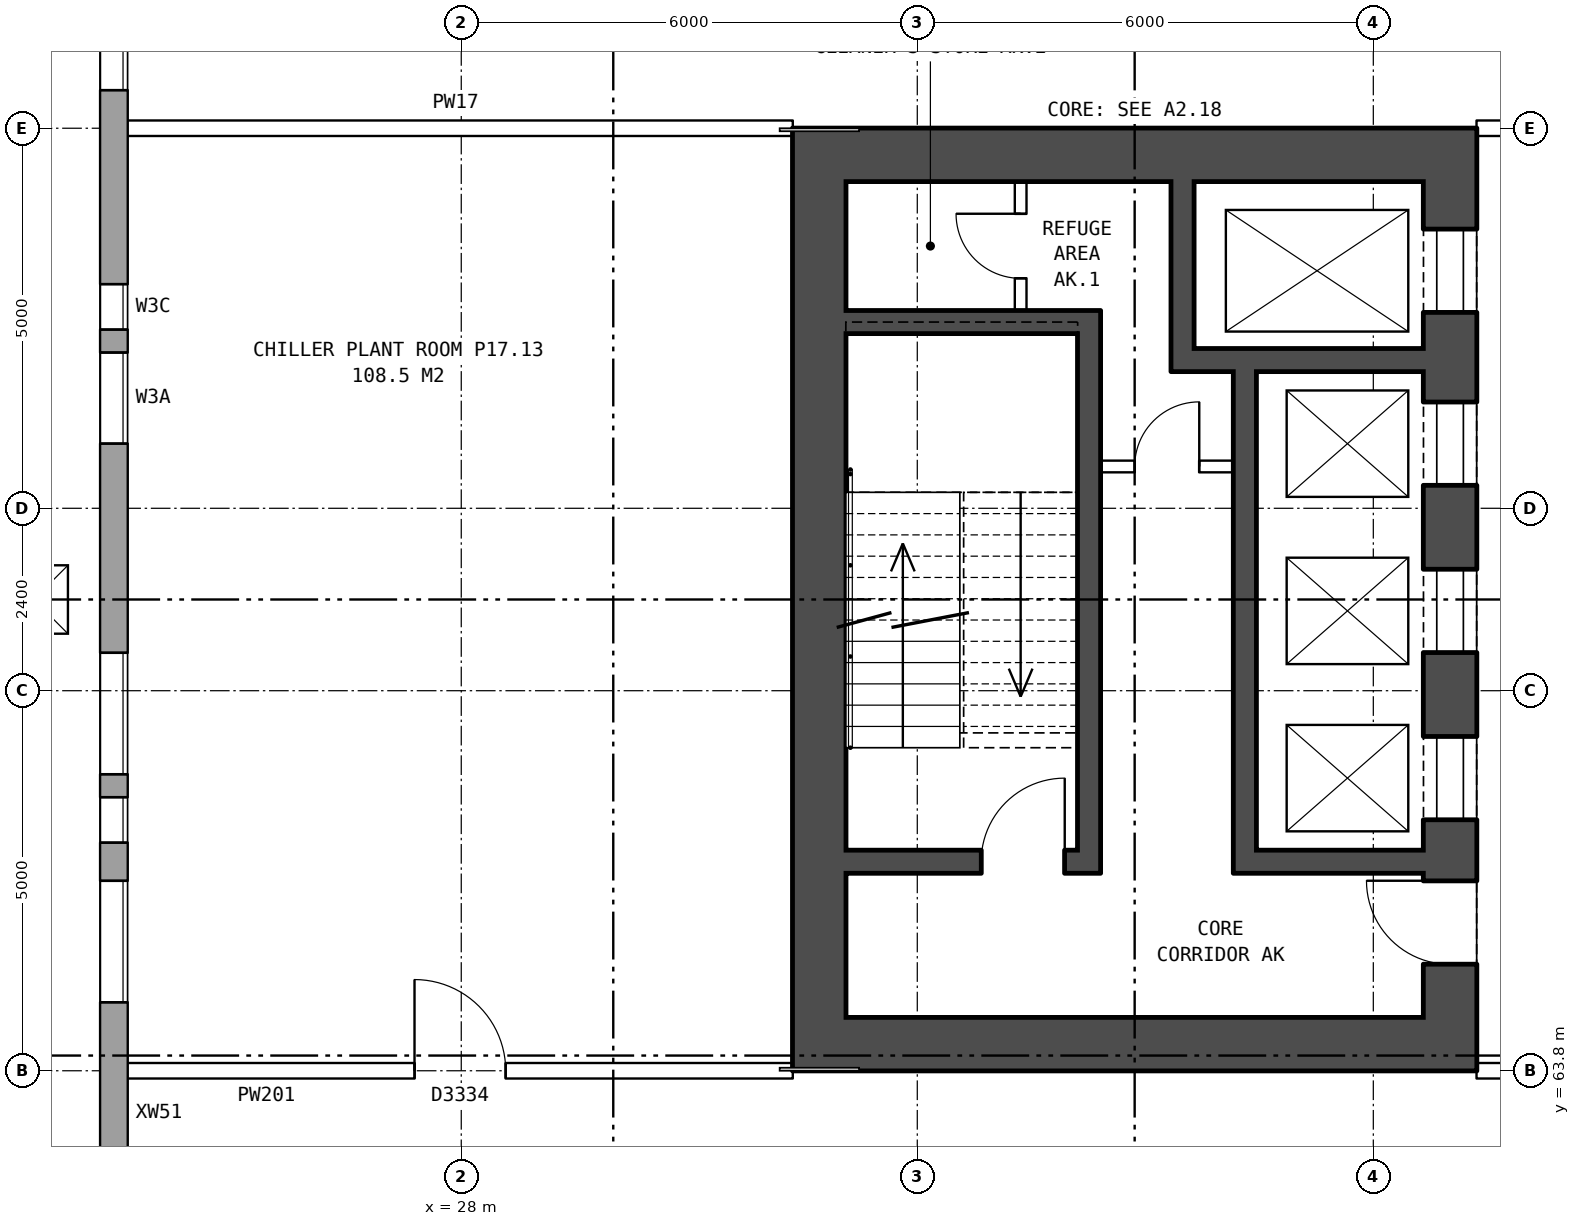
"""IFC4 building model, lengths in metres.
Left out: names, types, materials, properties, quantities, classifications, styles, units other than length and angle.
Written with IfcOpenShell. Run it as: python <this file> out.ifc"""

import sys

from ifc_helpers import new_model, si_unit, direction, frame, frame_2d, origin, origin_2d, place, context, subcontext, project, spatial, rectangle, extrude, element, fill, save


model = new_model("IFC4")
c1 = context("Model", 3, precision=1e-05, world=origin(), true_north=direction((0.0, 1.0)))
c2 = subcontext(c1, "Body", "Model", "MODEL_VIEW")
j1 = project(units=[si_unit("LENGTHUNIT", "METRE"), si_unit("PLANEANGLEUNIT", "RADIAN")], contexts=[c1])
p1 = place(None, origin())
s1 = spatial("IfcSite", under=j1, at=p1, CompositionType="ELEMENT")
p2 = place(p1, origin())
s2 = spatial("IfcBuilding", under=s1, at=p2, CompositionType="ELEMENT")
p3 = place(p2, frame((0.0, 0.0, 62.9)))
s3 = spatial("IfcBuildingStorey", under=s2, at=p3, CompositionType="ELEMENT", Elevation=62.9)
p4 = place(p3, frame((23.43, 82.925, 0.0), z_axis=(0.0, 0.0, 1.0), x_axis=(0.0, -1.0, 0.0)))
e1 = element("IfcWall", 1, at=p4, inside=s3, PredefinedType="STANDARD", context=c2, shape_type="SweptSolid", body=[
    extrude(rectangle(XDim=25.851, YDim=0.36, at=frame_2d((12.925, 0.0))), origin(), (0.0, 0.0, 1.0), 4.2),
])
p5 = place(p4, frame((1.625, 0.0, 1.5)))
e2 = element("IfcOpeningElement", 2, at=p5, cuts=e1, PredefinedType="OPENING", context=c2, shape_type="SweptSolid", body=[
    extrude(rectangle(XDim=1.6, YDim=1.2, at=frame_2d((0.8, 0.6))), frame((0.0, 0.19, 0.0), z_axis=(0.0, -1.0, 0.0), x_axis=(1.0, 0.0, 0.0)), (0.0, 0.0, 1.0), 0.38),
])
p6 = place(p4, frame((4.625, 0.0, 1.5)))
e3 = element("IfcOpeningElement", 3, at=p6, cuts=e1, PredefinedType="OPENING", context=c2, shape_type="SweptSolid", body=[
    extrude(rectangle(XDim=1.6, YDim=1.2, at=frame_2d((0.8, 0.6))), frame((0.0, 0.19, 0.0), z_axis=(0.0, -1.0, 0.0), x_axis=(1.0, 0.0, 0.0)), (0.0, 0.0, 1.0), 0.38),
])
p7 = place(p4, frame((8.775, 0.0, 1.5)))
e4 = element("IfcOpeningElement", 4, at=p7, cuts=e1, PredefinedType="OPENING", context=c2, shape_type="SweptSolid", body=[
    extrude(rectangle(XDim=0.6, YDim=1.2, at=frame_2d((0.3, 0.6))), frame((0.0, 0.19, 0.0), z_axis=(0.0, -1.0, 0.0), x_axis=(1.0, 0.0, 0.0)), (0.0, 0.0, 1.0), 0.38),
])
p8 = place(p4, frame((9.675, 0.0, 1.5)))
e5 = element("IfcOpeningElement", 5, at=p8, cuts=e1, PredefinedType="OPENING", context=c2, shape_type="SweptSolid", body=[
    extrude(rectangle(XDim=1.2, YDim=1.2, at=frame_2d((0.6, 0.6))), frame((0.0, 0.19, 0.0), z_axis=(0.0, -1.0, 0.0), x_axis=(1.0, 0.0, 0.0)), (0.0, 0.0, 1.0), 0.38),
])
p9 = place(p4, frame((13.625, 0.0, 1.5)))
e6 = element("IfcOpeningElement", 6, at=p9, cuts=e1, PredefinedType="OPENING", context=c2, shape_type="SweptSolid", body=[
    extrude(rectangle(XDim=1.6, YDim=1.2, at=frame_2d((0.8, 0.6))), frame((0.0, 0.19, 0.0), z_axis=(0.0, -1.0, 0.0), x_axis=(1.0, 0.0, 0.0)), (0.0, 0.0, 1.0), 0.38),
])
p10 = place(p4, frame((16.625, 0.0, 1.5)))
e7 = element("IfcOpeningElement", 7, at=p10, cuts=e1, PredefinedType="OPENING", context=c2, shape_type="SweptSolid", body=[
    extrude(rectangle(XDim=1.6, YDim=1.2, at=frame_2d((0.8, 0.6))), frame((0.0, 0.19, 0.0), z_axis=(0.0, -1.0, 0.0), x_axis=(1.0, 0.0, 0.0)), (0.0, 0.0, 1.0), 0.38),
])
p11 = place(p4, frame((21.125, 0.0, 1.5)))
e8 = element("IfcOpeningElement", 8, at=p11, cuts=e1, PredefinedType="OPENING", context=c2, shape_type="SweptSolid", body=[
    extrude(rectangle(XDim=0.6, YDim=1.2, at=frame_2d((0.3, 0.6))), frame((0.0, 0.19, 0.0), z_axis=(0.0, -1.0, 0.0), x_axis=(1.0, 0.0, 0.0)), (0.0, 0.0, 1.0), 0.38),
])
p12 = place(p4, frame((22.325, 0.0, 1.5)))
e9 = element("IfcOpeningElement", 9, at=p12, cuts=e1, PredefinedType="OPENING", context=c2, shape_type="SweptSolid", body=[
    extrude(rectangle(XDim=0.9, YDim=1.2, at=frame_2d((0.45, 0.6))), frame((0.0, 0.19, 0.0), z_axis=(0.0, -1.0, 0.0), x_axis=(1.0, 0.0, 0.0)), (0.0, 0.0, 1.0), 0.38),
])
p13 = place(p4, frame((15.525, 0.0, 1.5)))
e10 = element("IfcOpeningElement", 10, at=p13, cuts=e1, PredefinedType="OPENING", context=c2, shape_type="SweptSolid", body=[
    extrude(rectangle(XDim=0.6, YDim=1.2, at=frame_2d((0.3, 0.6))), frame((0.0, 0.19, 0.0), z_axis=(0.0, -1.0, 0.0), x_axis=(1.0, 0.0, 0.0)), (0.0, 0.0, 1.0), 0.38),
])
p14 = place(p3, frame((41.01, 75.5, 0.0), z_axis=(0.0, 0.0, 1.0), x_axis=(0.0, -1.0, 0.0)))
e11 = element("IfcWall", 11, at=p14, inside=s3, PredefinedType="SHEAR", context=c2, shape_type="SweptSolid", body=[
    extrude(rectangle(XDim=11.0, YDim=0.7, at=frame_2d((5.5, 0.0))), origin(), (0.0, 0.0, 1.0), 4.2),
])
p15 = place(p14, frame((0.625, 0.0, 0.0)))
e12 = element("IfcOpeningElement", 12, at=p15, cuts=e11, PredefinedType="OPENING", context=c2, shape_type="SweptSolid", body=[
    extrude(rectangle(XDim=1.1, YDim=2.1, at=frame_2d((0.55, 1.05))), frame((0.0, 0.36, 0.0), z_axis=(0.0, -1.0, 0.0), x_axis=(1.0, 0.0, 0.0)), (0.0, 0.0, 1.0), 0.72),
])
p16 = place(p14, frame((2.9, 0.0, 0.0)))
e13 = element("IfcOpeningElement", 13, at=p16, cuts=e11, PredefinedType="OPENING", context=c2, shape_type="SweptSolid", body=[
    extrude(rectangle(XDim=1.1, YDim=2.1, at=frame_2d((0.55, 1.05))), frame((0.0, 0.36, 0.0), z_axis=(0.0, -1.0, 0.0), x_axis=(1.0, 0.0, 0.0)), (0.0, 0.0, 1.0), 0.72),
])
p17 = place(p14, frame((5.1, 0.0, 0.0)))
e14 = element("IfcOpeningElement", 14, at=p17, cuts=e11, PredefinedType="OPENING", context=c2, shape_type="SweptSolid", body=[
    extrude(rectangle(XDim=1.1, YDim=2.1, at=frame_2d((0.55, 1.05))), frame((0.0, 0.36, 0.0), z_axis=(0.0, -1.0, 0.0), x_axis=(1.0, 0.0, 0.0)), (0.0, 0.0, 1.0), 0.72),
])
p18 = place(p14, frame((7.3, 0.0, 0.0)))
e15 = element("IfcOpeningElement", 15, at=p18, cuts=e11, PredefinedType="OPENING", context=c2, shape_type="SweptSolid", body=[
    extrude(rectangle(XDim=1.1, YDim=2.1, at=frame_2d((0.55, 1.05))), frame((0.0, 0.36, 0.0), z_axis=(0.0, -1.0, 0.0), x_axis=(1.0, 0.0, 0.0)), (0.0, 0.0, 1.0), 0.72),
])
p19 = place(p14, frame((9.2, 0.0, 0.0)))
e16 = element("IfcOpeningElement", 16, at=p19, cuts=e11, PredefinedType="OPENING", context=c2, shape_type="SweptSolid", body=[
    extrude(rectangle(XDim=1.1, YDim=2.1, at=frame_2d((0.55, 1.05))), frame((0.0, 0.36, 0.0), z_axis=(0.0, -1.0, 0.0), x_axis=(1.0, 0.0, 0.0)), (0.0, 0.0, 1.0), 0.72),
])
p20 = place(p3, frame((32.71, 75.5, 0.0), z_axis=(0.0, 0.0, 1.0), x_axis=(0.0, -1.0, 0.0)))
e17 = element("IfcWall", 17, at=p20, inside=s3, PredefinedType="SHEAR", context=c2, shape_type="SweptSolid", body=[
    extrude(rectangle(XDim=11.0, YDim=0.7, at=frame_2d((5.5, 0.0))), origin(), (0.0, 0.0, 1.0), 4.2),
])
for number, where, z_axis, x_axis in (
    (18, (41.36, 75.85, 0.0), (0.0, 0.0, 1.0), (-1.0, 0.0, 0.0)),
    (19, (41.36, 64.15, 0.0), (0.0, 0.0, 1.0), (-1.0, 0.0, 0.0)),
):
    element("IfcWall", number, at=place(p3, frame(where, z_axis=z_axis, x_axis=x_axis)), inside=s3, PredefinedType="SHEAR", context=c2, shape_type="SweptSolid", body=[
        extrude(rectangle(XDim=9.0, YDim=0.7, at=frame_2d((4.5, 0.0))), origin(), (0.0, 0.0, 1.0), 4.2),
    ])
p21 = place(p3, frame((36.11, 73.65, 0.0), z_axis=(0.0, 0.0, 1.0), x_axis=(-1.0, 0.0, 0.0)))
e20 = element("IfcWall", 20, at=p21, inside=s3, PredefinedType="SHEAR", context=c2, shape_type="SweptSolid", body=[
    extrude(rectangle(XDim=3.05, YDim=0.3, at=frame_2d((1.525, 0.0))), origin(), (0.0, 0.0, 1.0), 4.2),
])
p22 = place(p3, frame((40.66, 73.15, 0.0), z_axis=(0.0, 0.0, 1.0), x_axis=(-1.0, 0.0, 0.0)))
e21 = element("IfcWall", 21, at=p22, inside=s3, PredefinedType="SHEAR", context=c2, shape_type="SweptSolid", body=[
    extrude(rectangle(XDim=3.32, YDim=0.3, at=frame_2d((1.66, 0.0))), origin(), (0.0, 0.0, 1.0), 4.2),
])
p23 = place(p3, frame((38.16, 71.75, 0.0), z_axis=(0.0, 0.0, 1.0), x_axis=(-1.0, 0.0, 0.0)))
e22 = element("IfcWall", 22, at=p23, inside=s3, PredefinedType="PARTITIONING", context=c2, shape_type="SweptSolid", body=[
    extrude(rectangle(XDim=1.75, YDim=0.15, at=frame_2d((0.875, 0.0))), origin(), (0.0, 0.0, 1.0), 4.2),
])
p24 = place(p23, frame((0.45, 0.0, 0.0)))
e23 = element("IfcOpeningElement", 23, at=p24, cuts=e22, PredefinedType="OPENING", context=c2, shape_type="SweptSolid", body=[
    extrude(rectangle(XDim=0.85, YDim=2.1, at=frame_2d((0.425, 1.05))), frame((0.0, 0.085, 0.0), z_axis=(0.0, -1.0, 0.0), x_axis=(1.0, 0.0, 0.0)), (0.0, 0.0, 1.0), 0.17),
])
p25 = place(p3, frame((40.66, 66.55, 0.0), z_axis=(0.0, 0.0, 1.0), x_axis=(-1.0, 0.0, 0.0)))
e24 = element("IfcWall", 24, at=p25, inside=s3, PredefinedType="SHEAR", context=c2, shape_type="SweptSolid", body=[
    extrude(rectangle(XDim=2.2, YDim=0.3, at=frame_2d((1.1, 0.0))), origin(), (0.0, 0.0, 1.0), 4.2),
])
p26 = place(p3, frame((36.11, 66.55, 0.0), z_axis=(0.0, 0.0, 1.0), x_axis=(-1.0, 0.0, 0.0)))
e25 = element("IfcWall", 25, at=p26, inside=s3, PredefinedType="SHEAR", context=c2, shape_type="SweptSolid", body=[
    extrude(rectangle(XDim=3.05, YDim=0.3, at=frame_2d((1.525, 0.0))), origin(), (0.0, 0.0, 1.0), 4.2),
])
p27 = place(p26, frame((0.17, 0.0, 0.0)))
e26 = element("IfcOpeningElement", 26, at=p27, cuts=e25, PredefinedType="OPENING", context=c2, shape_type="SweptSolid", body=[
    extrude(rectangle(XDim=1.1, YDim=2.1, at=frame_2d((0.55, 1.05))), frame((0.0, 0.16, 0.0), z_axis=(0.0, -1.0, 0.0), x_axis=(1.0, 0.0, 0.0)), (0.0, 0.0, 1.0), 0.32),
])
p28 = place(p3, frame((38.31, 73.0, 0.0), z_axis=(0.0, 0.0, 1.0), x_axis=(0.0, -1.0, 0.0)))
e27 = element("IfcWall", 27, at=p28, inside=s3, PredefinedType="SHEAR", context=c2, shape_type="SweptSolid", body=[
    extrude(rectangle(XDim=6.6, YDim=0.3, at=frame_2d((3.3, 0.0))), origin(), (0.0, 0.0, 1.0), 4.2),
])
p29 = place(p3, frame((37.49, 75.5, 0.0), z_axis=(0.0, 0.0, 1.0), x_axis=(0.0, -1.0, 0.0)))
e28 = element("IfcWall", 28, at=p29, inside=s3, PredefinedType="SHEAR", context=c2, shape_type="SweptSolid", body=[
    extrude(rectangle(XDim=2.2, YDim=0.3, at=frame_2d((1.1, 0.0))), origin(), (0.0, 0.0, 1.0), 4.2),
])
p30 = place(p3, frame((36.26, 73.8, 0.0), z_axis=(0.0, 0.0, 1.0), x_axis=(0.0, -1.0, 0.0)))
e29 = element("IfcWall", 29, at=p30, inside=s3, PredefinedType="SHEAR", context=c2, shape_type="SweptSolid", body=[
    extrude(rectangle(XDim=7.4, YDim=0.3, at=frame_2d((3.7, 0.0))), origin(), (0.0, 0.0, 1.0), 4.2),
])
p31 = place(p3, frame((35.36, 75.5, 0.0), z_axis=(0.0, 0.0, 1.0), x_axis=(0.0, -1.0, 0.0)))
e30 = element("IfcWall", 30, at=p31, inside=s3, PredefinedType="PARTITIONING", context=c2, shape_type="SweptSolid", body=[
    extrude(rectangle(XDim=1.7, YDim=0.15, at=frame_2d((0.85, 0.0))), origin(), (0.0, 0.0, 1.0), 4.2),
])
p32 = place(p31, frame((0.425, 0.0, 0.0)))
e31 = element("IfcOpeningElement", 31, at=p32, cuts=e30, PredefinedType="OPENING", context=c2, shape_type="SweptSolid", body=[
    extrude(rectangle(XDim=0.85, YDim=2.1, at=frame_2d((0.425, 1.05))), frame((0.0, 0.085, 0.0), z_axis=(0.0, -1.0, 0.0), x_axis=(1.0, 0.0, 0.0)), (0.0, 0.0, 1.0), 0.17),
])
p33 = place(p3, frame((23.49, 63.8, 0.0), z_axis=(0.0, 0.0, 1.0), x_axis=(1.0, 0.0, 0.0)))
e32 = element("IfcWall", 32, at=p33, inside=s3, PredefinedType="PARTITIONING", context=c2, shape_type="SweptSolid", body=[
    extrude(rectangle(XDim=8.87, YDim=0.2, at=frame_2d((4.435, 0.0))), origin(), (0.0, 0.0, 1.0), 4.2),
])
p34 = place(p33, frame((3.895, 0.0, 0.0)))
e33 = element("IfcOpeningElement", 33, at=p34, cuts=e32, PredefinedType="OPENING", context=c2, shape_type="SweptSolid", body=[
    extrude(rectangle(XDim=1.2, YDim=2.1, at=frame_2d((0.6, 1.05))), frame((0.0, 0.11, 0.0), z_axis=(0.0, -1.0, 0.0), x_axis=(1.0, 0.0, 0.0)), (0.0, 0.0, 1.0), 0.22),
])
p35 = place(p3, frame((41.36, 63.8, 0.0), z_axis=(0.0, 0.0, 1.0), x_axis=(1.0, 0.0, 0.0)))
e34 = element("IfcWall", 34, at=p35, inside=s3, PredefinedType="PARTITIONING", context=c2, shape_type="SweptSolid", body=[
    extrude(rectangle(XDim=3.1, YDim=0.2, at=frame_2d((1.55, 0.0))), origin(), (0.0, 0.0, 1.0), 4.2),
])
p36 = place(p35, frame((1.0, 0.0, 0.0)))
e35 = element("IfcOpeningElement", 35, at=p36, cuts=e34, PredefinedType="OPENING", context=c2, shape_type="SweptSolid", body=[
    extrude(rectangle(XDim=1.0, YDim=2.1, at=frame_2d((0.5, 1.05))), frame((0.0, 0.11, 0.0), z_axis=(0.0, -1.0, 0.0), x_axis=(1.0, 0.0, 0.0)), (0.0, 0.0, 1.0), 0.22),
])
p37 = place(p3, frame((23.49, 76.2, 0.0), z_axis=(0.0, 0.0, 1.0), x_axis=(1.0, 0.0, 0.0)))
e36 = element("IfcWall", 36, at=p37, inside=s3, PredefinedType="PARTITIONING", context=c2, shape_type="SweptSolid", body=[
    extrude(rectangle(XDim=8.87, YDim=0.2, at=frame_2d((4.435, 0.0))), origin(), (0.0, 0.0, 1.0), 4.2),
])
p38 = place(p3, frame((41.36, 76.2, 0.0), z_axis=(0.0, 0.0, 1.0), x_axis=(1.0, 0.0, 0.0)))
e37 = element("IfcWall", 37, at=p38, inside=s3, PredefinedType="PARTITIONING", context=c2, shape_type="SweptSolid", body=[
    extrude(rectangle(XDim=3.1, YDim=0.2, at=frame_2d((1.55, 0.0))), origin(), (0.0, 0.0, 1.0), 4.2),
])
p39 = place(p38, frame((1.0, 0.0, 0.0)))
e38 = element("IfcOpeningElement", 38, at=p39, cuts=e37, PredefinedType="OPENING", context=c2, shape_type="SweptSolid", body=[
    extrude(rectangle(XDim=1.0, YDim=2.1, at=frame_2d((0.5, 1.05))), frame((0.0, 0.11, 0.0), z_axis=(0.0, -1.0, 0.0), x_axis=(1.0, 0.0, 0.0)), (0.0, 0.0, 1.0), 0.22),
])
p40 = place(p6, origin())
e39 = element("IfcWindow", 39, at=p40, inside=s3, PartitioningType="DOUBLE_PANEL_HORIZONTAL", PredefinedType="WINDOW", context=c2, shape_type="SweptSolid", body=[
    extrude(rectangle(XDim=1.6, YDim=1.2, at=frame_2d((0.8, 0.6))), frame((0.0, 0.15, 0.0), z_axis=(0.0, -1.0, 0.0), x_axis=(1.0, 0.0, 0.0)), (0.0, 0.0, 1.0), 0.06),
])
fill(e3, e39)
p41 = place(p7, origin())
e40 = element("IfcWindow", 40, at=p41, inside=s3, PartitioningType="DOUBLE_PANEL_HORIZONTAL", PredefinedType="WINDOW", context=c2, shape_type="SweptSolid", body=[
    extrude(rectangle(XDim=0.6, YDim=1.2, at=frame_2d((0.3, 0.6))), frame((0.0, 0.15, 0.0), z_axis=(0.0, -1.0, 0.0), x_axis=(1.0, 0.0, 0.0)), (0.0, 0.0, 1.0), 0.06),
])
fill(e4, e40)
p42 = place(p8, origin())
e41 = element("IfcWindow", 41, at=p42, inside=s3, PartitioningType="DOUBLE_PANEL_HORIZONTAL", PredefinedType="WINDOW", context=c2, shape_type="SweptSolid", body=[
    extrude(rectangle(XDim=1.2, YDim=1.2, at=frame_2d((0.6, 0.6))), frame((0.0, 0.15, 0.0), z_axis=(0.0, -1.0, 0.0), x_axis=(1.0, 0.0, 0.0)), (0.0, 0.0, 1.0), 0.06),
])
fill(e5, e41)
p43 = place(p9, origin())
e42 = element("IfcWindow", 42, at=p43, inside=s3, PartitioningType="DOUBLE_PANEL_HORIZONTAL", PredefinedType="WINDOW", context=c2, shape_type="SweptSolid", body=[
    extrude(rectangle(XDim=1.6, YDim=1.2, at=frame_2d((0.8, 0.6))), frame((0.0, 0.15, 0.0), z_axis=(0.0, -1.0, 0.0), x_axis=(1.0, 0.0, 0.0)), (0.0, 0.0, 1.0), 0.06),
])
fill(e6, e42)
p44 = place(p10, origin())
e43 = element("IfcWindow", 43, at=p44, inside=s3, PartitioningType="DOUBLE_PANEL_HORIZONTAL", PredefinedType="WINDOW", context=c2, shape_type="SweptSolid", body=[
    extrude(rectangle(XDim=1.6, YDim=1.2, at=frame_2d((0.8, 0.6))), frame((0.0, 0.15, 0.0), z_axis=(0.0, -1.0, 0.0), x_axis=(1.0, 0.0, 0.0)), (0.0, 0.0, 1.0), 0.06),
])
fill(e7, e43)
p45 = place(p3, frame((0.0, 0.0, -0.25)))
p46 = place(p45, frame((22.375, 70.0, 0.0)))
p47 = place(p46, frame((0.0, 0.0, 0.2)))
e44 = element("IfcWindow", 44, at=p47, inside=s3, PartitioningType="SINGLE_PANEL", PredefinedType="SKYLIGHT", context=c2, shape_type="SweptSolid", body=[
    extrude(rectangle(XDim=0.9, YDim=0.9, at=origin_2d()), origin(), (0.0, 0.0, 1.0), 0.05),
])
p48 = place(p15, origin())
e45 = element("IfcDoor", 45, at=p48, inside=s3, OperationType="DOUBLE_DOOR_SLIDING", PredefinedType="DOOR", context=c2, shape_type="SweptSolid", body=[
    extrude(rectangle(XDim=1.1, YDim=2.1, at=frame_2d((0.55, 1.05))), frame((0.0, -0.285, 0.0), z_axis=(0.0, -1.0, 0.0), x_axis=(1.0, 0.0, 0.0)), (0.0, 0.0, 1.0), 0.05),
])
fill(e12, e45)
p49 = place(p16, origin())
e46 = element("IfcDoor", 46, at=p49, inside=s3, OperationType="DOUBLE_DOOR_SLIDING", PredefinedType="DOOR", context=c2, shape_type="SweptSolid", body=[
    extrude(rectangle(XDim=1.1, YDim=2.1, at=frame_2d((0.55, 1.05))), frame((0.0, -0.285, 0.0), z_axis=(0.0, -1.0, 0.0), x_axis=(1.0, 0.0, 0.0)), (0.0, 0.0, 1.0), 0.05),
])
fill(e13, e46)
p50 = place(p17, origin())
e47 = element("IfcDoor", 47, at=p50, inside=s3, OperationType="DOUBLE_DOOR_SLIDING", PredefinedType="DOOR", context=c2, shape_type="SweptSolid", body=[
    extrude(rectangle(XDim=1.1, YDim=2.1, at=frame_2d((0.55, 1.05))), frame((0.0, -0.285, 0.0), z_axis=(0.0, -1.0, 0.0), x_axis=(1.0, 0.0, 0.0)), (0.0, 0.0, 1.0), 0.05),
])
fill(e14, e47)
p51 = place(p18, origin())
e48 = element("IfcDoor", 48, at=p51, inside=s3, OperationType="DOUBLE_DOOR_SLIDING", PredefinedType="DOOR", context=c2, shape_type="SweptSolid", body=[
    extrude(rectangle(XDim=1.1, YDim=2.1, at=frame_2d((0.55, 1.05))), frame((0.0, -0.285, 0.0), z_axis=(0.0, -1.0, 0.0), x_axis=(1.0, 0.0, 0.0)), (0.0, 0.0, 1.0), 0.05),
])
fill(e15, e48)
p52 = place(p19, frame((1.1, 0.0, 0.0), z_axis=(0.0, 0.0, 1.0), x_axis=(-1.0, 0.0, 0.0)))
e49 = element("IfcDoor", 49, at=p52, inside=s3, OperationType="SINGLE_SWING_RIGHT", PredefinedType="DOOR", context=c2, shape_type="SweptSolid", body=[
    extrude(rectangle(XDim=1.1, YDim=2.1, at=frame_2d((0.55, 1.05))), frame((0.0, 0.335, 0.0), z_axis=(0.0, -1.0, 0.0), x_axis=(1.0, 0.0, 0.0)), (0.0, 0.0, 1.0), 0.05),
])
fill(e16, e49)
p53 = place(p27, frame((1.1, 0.0, 0.0), z_axis=(0.0, 0.0, 1.0), x_axis=(-1.0, 0.0, 0.0)))
e50 = element("IfcDoor", 50, at=p53, inside=s3, OperationType="SINGLE_SWING_RIGHT", PredefinedType="DOOR", context=c2, shape_type="SweptSolid", body=[
    extrude(rectangle(XDim=1.1, YDim=2.1, at=frame_2d((0.55, 1.05))), frame((0.0, 0.025, 0.0), z_axis=(0.0, -1.0, 0.0), x_axis=(1.0, 0.0, 0.0)), (0.0, 0.0, 1.0), 0.05),
])
fill(e26, e50)
p54 = place(p24, frame((0.85, 0.0, 0.0), z_axis=(0.0, 0.0, 1.0), x_axis=(-1.0, 0.0, 0.0)))
e51 = element("IfcDoor", 51, at=p54, inside=s3, OperationType="SINGLE_SWING_RIGHT", PredefinedType="DOOR", context=c2, shape_type="SweptSolid", body=[
    extrude(rectangle(XDim=0.85, YDim=2.1, at=frame_2d((0.425, 1.05))), frame((0.0, 0.025, 0.0), z_axis=(0.0, -1.0, 0.0), x_axis=(1.0, 0.0, 0.0)), (0.0, 0.0, 1.0), 0.05),
])
fill(e23, e51)
p55 = place(p32, frame((0.85, 0.0, 0.0), z_axis=(0.0, 0.0, 1.0), x_axis=(-1.0, 0.0, 0.0)))
e52 = element("IfcDoor", 52, at=p55, inside=s3, OperationType="SINGLE_SWING_RIGHT", PredefinedType="DOOR", context=c2, shape_type="SweptSolid", body=[
    extrude(rectangle(XDim=0.85, YDim=2.1, at=frame_2d((0.425, 1.05))), frame((0.0, 0.025, 0.0), z_axis=(0.0, -1.0, 0.0), x_axis=(1.0, 0.0, 0.0)), (0.0, 0.0, 1.0), 0.05),
])
fill(e31, e52)
p56 = place(p34, origin())
e53 = element("IfcDoor", 53, at=p56, inside=s3, OperationType="SINGLE_SWING_LEFT", PredefinedType="DOOR", context=c2, shape_type="SweptSolid", body=[
    extrude(rectangle(XDim=1.2, YDim=2.1, at=frame_2d((0.6, 1.05))), frame((0.0, 0.025, 0.0), z_axis=(0.0, -1.0, 0.0), x_axis=(1.0, 0.0, 0.0)), (0.0, 0.0, 1.0), 0.05),
])
fill(e33, e53)
p57 = place(p13, origin())
e54 = element("IfcWindow", 54, at=p57, inside=s3, PartitioningType="DOUBLE_PANEL_HORIZONTAL", PredefinedType="WINDOW", context=c2, shape_type="SweptSolid", body=[
    extrude(rectangle(XDim=0.6, YDim=1.2, at=frame_2d((0.3, 0.6))), frame((0.0, 0.15, 0.0), z_axis=(0.0, -1.0, 0.0), x_axis=(1.0, 0.0, 0.0)), (0.0, 0.0, 1.0), 0.06),
])
fill(e10, e54)
save(model, sys.argv[1])
